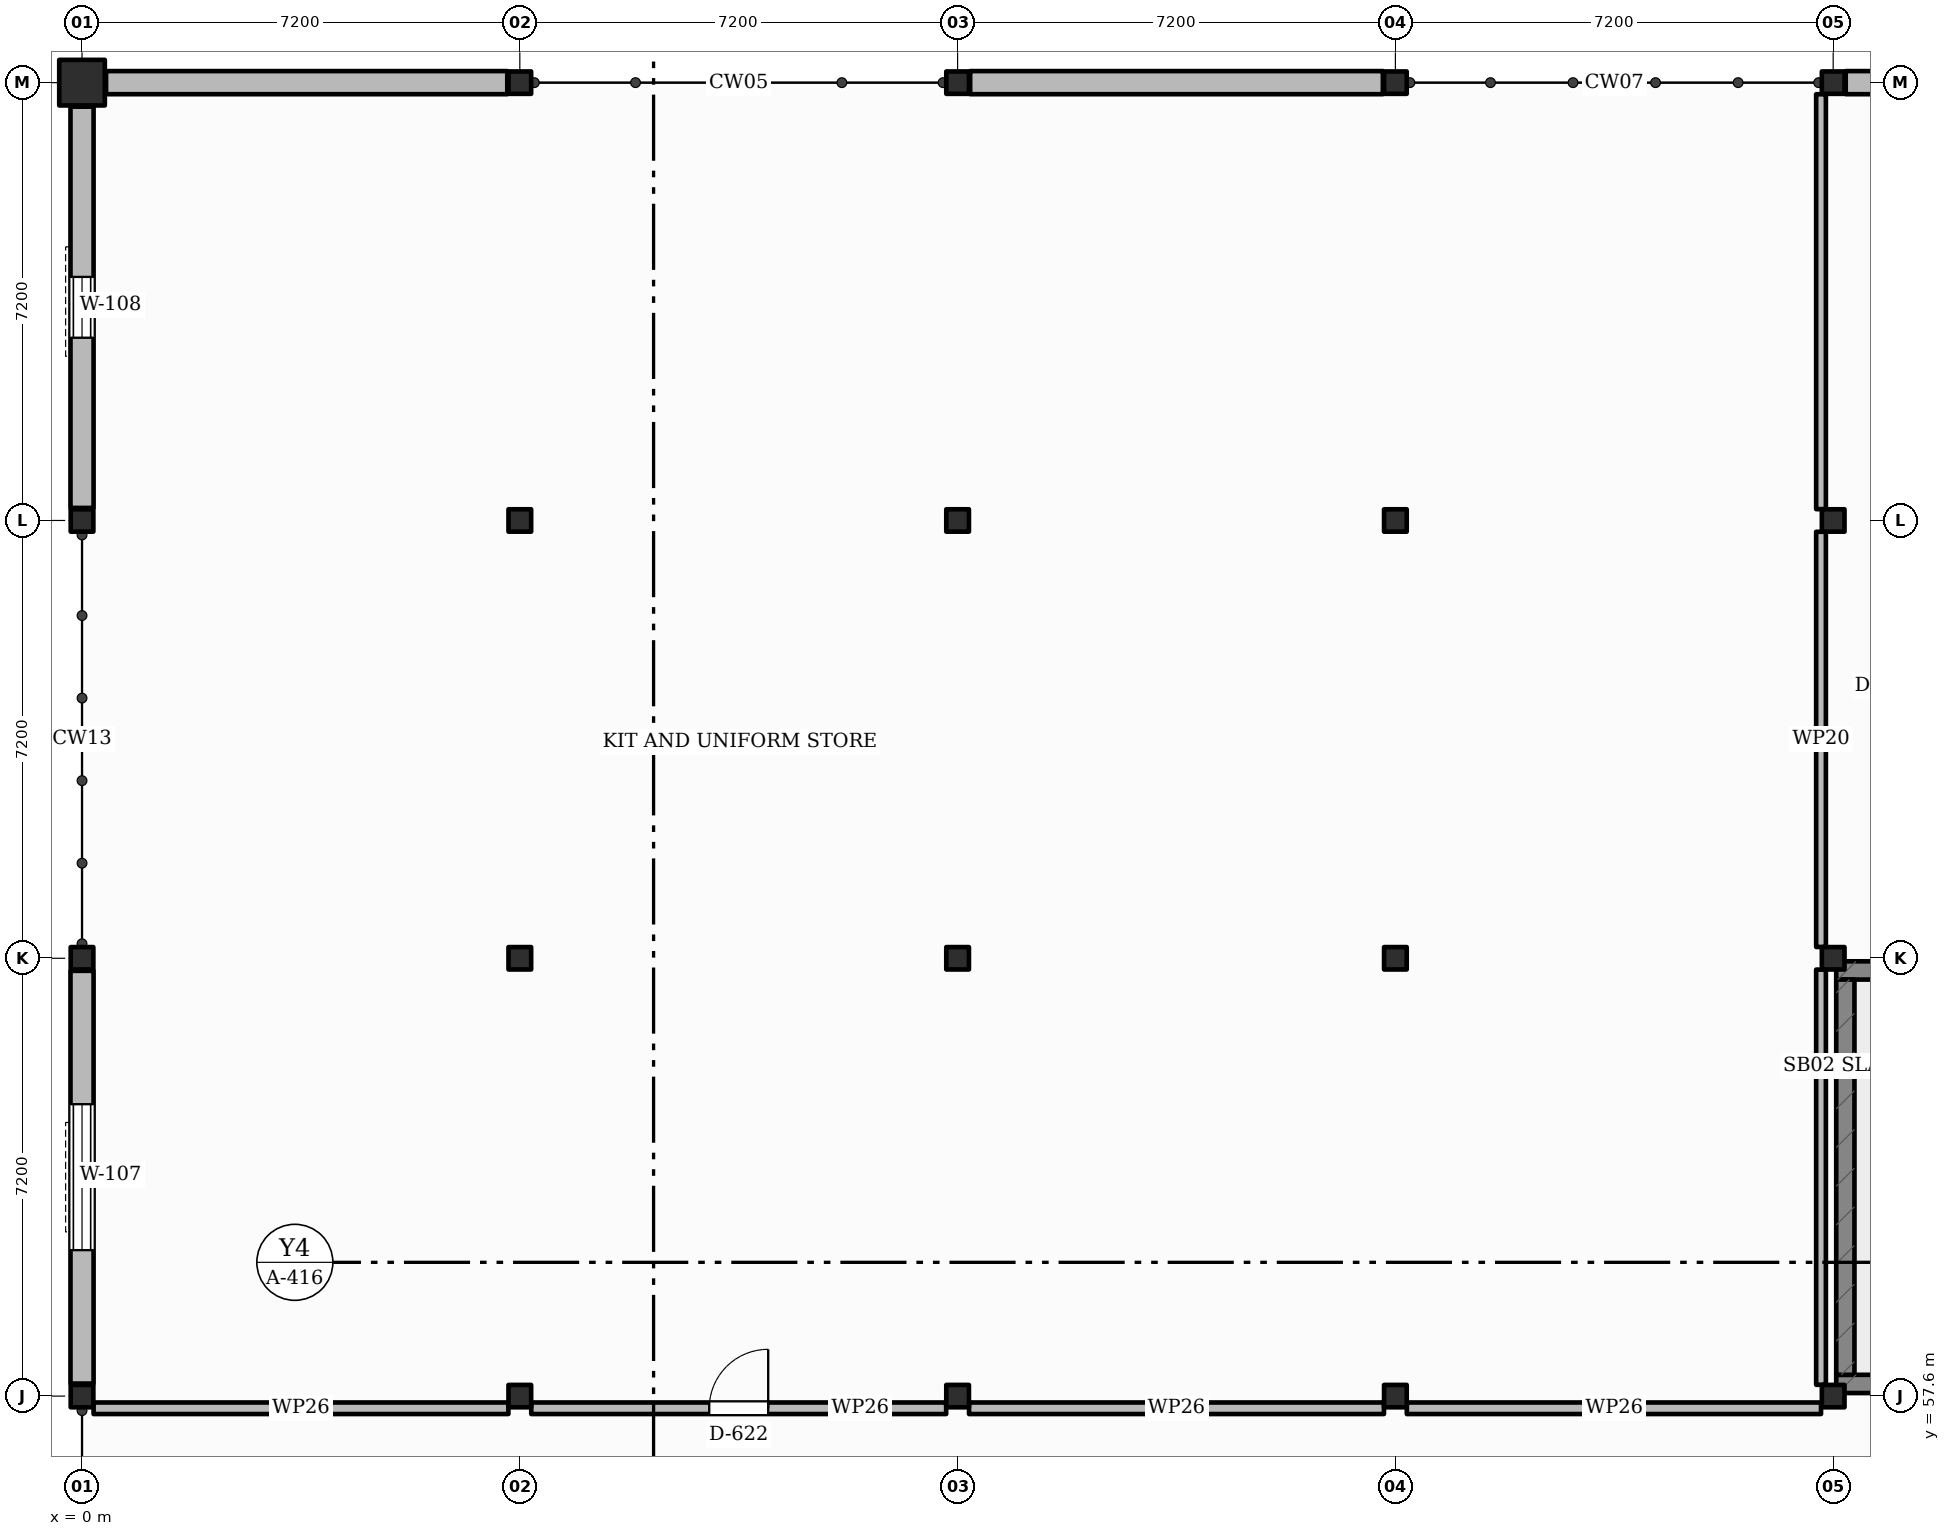
"""IFC4 building model, lengths in metres.
Left out: names, types, materials, properties, quantities, classifications, styles, units other than length and angle.
Written with IfcOpenShell. Run it as: python <this file> out.ifc"""

import sys

from ifc_helpers import new_model, si_unit, direction, frame, frame_2d, origin, origin_2d, place, context, subcontext, project, spatial, rectangle, i_section, extrude, element, fill, save


model = new_model("IFC4")
c1 = context("Model", 3, precision=1e-05, world=origin(), true_north=direction((0.0, 1.0)))
c2 = subcontext(c1, "Body", "Model", "MODEL_VIEW")
j1 = project(units=[si_unit("LENGTHUNIT", "METRE"), si_unit("PLANEANGLEUNIT", "RADIAN")], contexts=[c1])
p1 = place(None, origin())
s1 = spatial("IfcSite", under=j1, at=p1, CompositionType="ELEMENT")
p2 = place(p1, origin())
s2 = spatial("IfcBuilding", under=s1, at=p2, CompositionType="ELEMENT")
p3 = place(p2, origin())
s3 = spatial("IfcBuildingStorey", under=s2, at=p3, CompositionType="ELEMENT", Elevation=0.0)
for number, where, z_axis, x_axis in (
    (1, (0.0, 57.6, -0.3), (0.0, 0.0, 1.0), (1.0, 0.0, 0.0)),
    (2, (0.0, 64.8, -0.3), (0.0, 0.0, 1.0), (1.0, 0.0, 0.0)),
    (3, (0.0, 72.0, -0.3), (0.0, 0.0, 1.0), (1.0, 0.0, 0.0)),
):
    element("IfcColumn", number, at=place(p3, frame(where, z_axis=z_axis, x_axis=x_axis)), inside=s3, PredefinedType="COLUMN", context=c2, shape_type="SweptSolid", body=[
        extrude(i_section(OverallWidth=0.373, OverallDepth=0.368, WebThickness=0.014, FlangeThickness=0.024, FilletRadius=0.015, at=origin_2d()), origin(), (0.0, 0.0, 1.0), 5.7),
    ])
p4 = place(p3, frame((0.0, 79.2, -0.3), z_axis=(0.0, 0.0, 1.0), x_axis=(1.0, 0.0, 0.0)))
e4 = element("IfcColumn", 4, at=p4, inside=s3, PredefinedType="COLUMN", context=c2, shape_type="SweptSolid", body=[
    extrude(rectangle(XDim=0.75, YDim=0.75, at=origin_2d()), origin(), (0.0, 0.0, 1.0), 5.7),
])
for number, where, z_axis, x_axis in (
    (5, (7.2, 57.6, -0.3), (0.0, 0.0, 1.0), (1.0, 0.0, 0.0)),
    (6, (7.2, 64.8, -0.3), (0.0, 0.0, 1.0), (1.0, 0.0, 0.0)),
    (7, (7.2, 72.0, -0.3), (0.0, 0.0, 1.0), (1.0, 0.0, 0.0)),
    (8, (7.2, 79.2, -0.3), (0.0, 0.0, 1.0), (1.0, 0.0, 0.0)),
    (9, (14.4, 57.6, -0.3), (0.0, 0.0, 1.0), (1.0, 0.0, 0.0)),
    (10, (14.4, 64.8, -0.3), (0.0, 0.0, 1.0), (1.0, 0.0, 0.0)),
    (11, (14.4, 72.0, -0.3), (0.0, 0.0, 1.0), (1.0, 0.0, 0.0)),
    (12, (14.4, 79.2, -0.3), (0.0, 0.0, 1.0), (1.0, 0.0, 0.0)),
    (13, (21.6, 57.6, -0.3), (0.0, 0.0, 1.0), (1.0, 0.0, 0.0)),
    (14, (21.6, 64.8, -0.3), (0.0, 0.0, 1.0), (1.0, 0.0, 0.0)),
    (15, (21.6, 72.0, -0.3), (0.0, 0.0, 1.0), (1.0, 0.0, 0.0)),
    (16, (21.6, 79.2, -0.3), (0.0, 0.0, 1.0), (1.0, 0.0, 0.0)),
    (17, (28.8, 57.6, -0.3), (0.0, 0.0, 1.0), (1.0, 0.0, 0.0)),
    (18, (28.8, 64.8, -0.3), (0.0, 0.0, 1.0), (1.0, 0.0, 0.0)),
    (19, (28.8, 72.0, -0.3), (0.0, 0.0, 1.0), (1.0, 0.0, 0.0)),
    (20, (28.8, 79.2, -0.3), (0.0, 0.0, 1.0), (1.0, 0.0, 0.0)),
):
    element("IfcColumn", number, at=place(p3, frame(where, z_axis=z_axis, x_axis=x_axis)), inside=s3, PredefinedType="COLUMN", context=c2, shape_type="SweptSolid", body=[
        extrude(i_section(OverallWidth=0.373, OverallDepth=0.368, WebThickness=0.014, FlangeThickness=0.024, FilletRadius=0.015, at=origin_2d()), origin(), (0.0, 0.0, 1.0), 5.7),
    ])
p5 = place(p3, frame((0.0, 57.806, 0.0), z_axis=(0.0, 0.0, 1.0), x_axis=(0.0, 1.0, 0.0)))
e21 = element("IfcWall", 21, at=p5, inside=s3, PredefinedType="SOLIDWALL", context=c2, shape_type="SweptSolid", body=[
    extrude(rectangle(XDim=6.787, YDim=0.38, at=frame_2d((3.394, 0.0))), origin(), (0.0, 0.0, 1.0), 4.594),
])
p6 = place(p5, frame((2.194, 0.0, 1.05)))
e22 = element("IfcOpeningElement", 22, at=p6, cuts=e21, PredefinedType="OPENING", context=c2, shape_type="SweptSolid", body=[
    extrude(rectangle(XDim=2.4, YDim=1.8, at=frame_2d((1.2, 0.9))), frame((0.0, 0.2, 0.0), z_axis=(0.0, -1.0, 0.0), x_axis=(1.0, 0.0, 0.0)), (0.0, 0.0, 1.0), 0.4),
])
p7 = place(p3, frame((0.0, 72.206, 0.0), z_axis=(0.0, 0.0, 1.0), x_axis=(0.0, 1.0, 0.0)))
e23 = element("IfcWall", 23, at=p7, inside=s3, PredefinedType="SOLIDWALL", context=c2, shape_type="SweptSolid", body=[
    extrude(rectangle(XDim=6.599, YDim=0.38, at=frame_2d((3.299, 0.0))), origin(), (0.0, 0.0, 1.0), 4.594),
])
p8 = place(p7, frame((2.799, 0.0, 1.05)))
e24 = element("IfcOpeningElement", 24, at=p8, cuts=e23, PredefinedType="OPENING", context=c2, shape_type="SweptSolid", body=[
    extrude(rectangle(XDim=1.0, YDim=1.6, at=frame_2d((0.5, 0.8))), frame((0.0, 0.2, 0.0), z_axis=(0.0, -1.0, 0.0), x_axis=(1.0, 0.0, 0.0)), (0.0, 0.0, 1.0), 0.4),
])
p9 = place(p3, frame((0.395, 79.2, 0.0), z_axis=(0.0, 0.0, 1.0), x_axis=(1.0, 0.0, 0.0)))
e25 = element("IfcWall", 25, at=p9, inside=s3, PredefinedType="SOLIDWALL", context=c2, shape_type="SweptSolid", body=[
    extrude(rectangle(XDim=6.599, YDim=0.38, at=frame_2d((3.299, 0.0))), origin(), (0.0, 0.0, 1.0), 4.279),
])
p10 = place(p3, frame((14.606, 79.2, 0.0), z_axis=(0.0, 0.0, 1.0), x_axis=(1.0, 0.0, 0.0)))
e26 = element("IfcWall", 26, at=p10, inside=s3, PredefinedType="SOLIDWALL", context=c2, shape_type="SweptSolid", body=[
    extrude(rectangle(XDim=6.788, YDim=0.38, at=frame_2d((3.394, 0.0))), origin(), (0.0, 0.0, 1.0), 4.279),
])
p11 = place(p3, frame((29.006, 79.2, 0.0), z_axis=(0.0, 0.0, 1.0), x_axis=(1.0, 0.0, 0.0)))
e27 = element("IfcWall", 27, at=p11, inside=s3, PredefinedType="SOLIDWALL", context=c2, shape_type="SweptSolid", body=[
    extrude(rectangle(XDim=6.787, YDim=0.38, at=frame_2d((3.394, 0.0))), origin(), (0.0, 0.0, 1.0), 4.48),
])
p12 = place(p11, frame((2.719, 0.0, 0.0)))
e28 = element("IfcOpeningElement", 28, at=p12, cuts=e27, PredefinedType="OPENING", context=c2, shape_type="SweptSolid", body=[
    extrude(rectangle(XDim=1.35, YDim=2.15, at=frame_2d((0.675, 1.075))), frame((0.0, 0.2, 0.0), z_axis=(0.0, -1.0, 0.0), x_axis=(1.0, 0.0, 0.0)), (0.0, 0.0, 1.0), 0.4),
])
p13 = place(p3, frame((28.85, 57.8, 0.0), z_axis=(0.0, 0.0, 1.0), x_axis=(1.0, 0.0, 0.0)))
e29 = element("IfcWall", 29, at=p13, inside=s3, PredefinedType="SHEAR", context=c2, shape_type="SweptSolid", body=[
    extrude(rectangle(XDim=14.35, YDim=0.3, at=frame_2d((7.175, 0.0))), origin(), (0.0, 0.0, 1.0), 4.45),
])
p14 = place(p13, frame((11.5, 0.0, 0.0)))
e30 = element("IfcOpeningElement", 30, at=p14, cuts=e29, PredefinedType="OPENING", context=c2, shape_type="SweptSolid", body=[
    extrude(rectangle(XDim=1.5, YDim=2.15, at=frame_2d((0.75, 1.075))), frame((0.0, 0.16, 0.0), z_axis=(0.0, -1.0, 0.0), x_axis=(1.0, 0.0, 0.0)), (0.0, 0.0, 1.0), 0.32),
])
p15 = place(p3, frame((28.85, 64.6, 0.0), z_axis=(0.0, 0.0, 1.0), x_axis=(1.0, 0.0, 0.0)))
e31 = element("IfcWall", 31, at=p15, inside=s3, PredefinedType="SHEAR", context=c2, shape_type="SweptSolid", body=[
    extrude(rectangle(XDim=14.35, YDim=0.3, at=frame_2d((7.175, 0.0))), origin(), (0.0, 0.0, 1.0), 4.45),
])
p16 = place(p3, frame((29.0, 57.95, 0.0), z_axis=(0.0, 0.0, 1.0), x_axis=(0.0, 1.0, 0.0)))
e32 = element("IfcWall", 32, at=p16, inside=s3, PredefinedType="SHEAR", context=c2, shape_type="SweptSolid", body=[
    extrude(rectangle(XDim=6.5, YDim=0.3, at=frame_2d((3.25, 0.0))), origin(), (0.0, 0.0, 1.0), 4.45),
])
p17 = place(p3, frame((0.19, 57.4, 0.0), z_axis=(0.0, 0.0, 1.0), x_axis=(1.0, 0.0, 0.0)))
e33 = element("IfcWall", 33, at=p17, inside=s3, PredefinedType="PARTITIONING", context=c2, shape_type="SweptSolid", body=[
    extrude(rectangle(XDim=6.822, YDim=0.19, at=frame_2d((3.411, 0.0))), origin(), (0.0, 0.0, 1.0), 3.55),
])
p18 = place(p3, frame((7.388, 57.4, 0.0), z_axis=(0.0, 0.0, 1.0), x_axis=(1.0, 0.0, 0.0)))
e34 = element("IfcWall", 34, at=p18, inside=s3, PredefinedType="PARTITIONING", context=c2, shape_type="SweptSolid", body=[
    extrude(rectangle(XDim=6.824, YDim=0.19, at=frame_2d((3.412, 0.0))), origin(), (0.0, 0.0, 1.0), 3.55),
])
p19 = place(p18, frame((2.927, 0.0, 0.0)))
e35 = element("IfcOpeningElement", 35, at=p19, cuts=e34, PredefinedType="OPENING", context=c2, shape_type="SweptSolid", body=[
    extrude(rectangle(XDim=0.97, YDim=2.12, at=frame_2d((0.485, 1.06))), frame((0.0, 0.105, 0.0), z_axis=(0.0, -1.0, 0.0), x_axis=(1.0, 0.0, 0.0)), (0.0, 0.0, 1.0), 0.21),
])
p20 = place(p3, frame((14.588, 57.4, 0.0), z_axis=(0.0, 0.0, 1.0), x_axis=(1.0, 0.0, 0.0)))
e36 = element("IfcWall", 36, at=p20, inside=s3, PredefinedType="PARTITIONING", context=c2, shape_type="SweptSolid", body=[
    extrude(rectangle(XDim=6.824, YDim=0.19, at=frame_2d((3.412, 0.0))), origin(), (0.0, 0.0, 1.0), 3.55),
])
p21 = place(p3, frame((21.788, 57.4, 0.0), z_axis=(0.0, 0.0, 1.0), x_axis=(1.0, 0.0, 0.0)))
e37 = element("IfcWall", 37, at=p21, inside=s3, PredefinedType="PARTITIONING", context=c2, shape_type="SweptSolid", body=[
    extrude(rectangle(XDim=6.812, YDim=0.19, at=frame_2d((3.406, 0.0))), origin(), (0.0, 0.0, 1.0), 3.55),
])
p22 = place(p3, frame((28.6, 57.786, 0.0), z_axis=(0.0, 0.0, 1.0), x_axis=(0.0, 1.0, 0.0)))
e38 = element("IfcWall", 38, at=p22, inside=s3, PredefinedType="PARTITIONING", context=c2, shape_type="SweptSolid", body=[
    extrude(rectangle(XDim=6.828, YDim=0.16, at=frame_2d((3.414, 0.0))), origin(), (0.0, 0.0, 1.0), 3.55),
])
p23 = place(p3, frame((28.6, 64.986, 0.0), z_axis=(0.0, 0.0, 1.0), x_axis=(0.0, 1.0, 0.0)))
e39 = element("IfcWall", 39, at=p23, inside=s3, PredefinedType="PARTITIONING", context=c2, shape_type="SweptSolid", body=[
    extrude(rectangle(XDim=6.828, YDim=0.16, at=frame_2d((3.414, 0.0))), origin(), (0.0, 0.0, 1.0), 3.55),
])
p24 = place(p3, frame((28.6, 72.186, 0.0), z_axis=(0.0, 0.0, 1.0), x_axis=(0.0, 1.0, 0.0)))
e40 = element("IfcWall", 40, at=p24, inside=s3, PredefinedType="PARTITIONING", context=c2, shape_type="SweptSolid", body=[
    extrude(rectangle(XDim=6.824, YDim=0.16, at=frame_2d((3.412, 0.0))), origin(), (0.0, 0.0, 1.0), 3.55),
])
p25 = place(p6, origin())
e41 = element("IfcWindow", 41, at=p25, inside=s3, PartitioningType="SINGLE_PANEL", PredefinedType="WINDOW", context=c2, shape_type="SweptSolid", body=[
    extrude(rectangle(XDim=2.4, YDim=1.8, at=frame_2d((1.2, 0.9))), frame((0.0, 0.03, 0.0), z_axis=(0.0, -1.0, 0.0), x_axis=(1.0, 0.0, 0.0)), (0.0, 0.0, 1.0), 0.06),
])
fill(e22, e41)
p26 = place(p8, origin())
e42 = element("IfcWindow", 42, at=p26, inside=s3, PartitioningType="SINGLE_PANEL", PredefinedType="WINDOW", context=c2, shape_type="SweptSolid", body=[
    extrude(rectangle(XDim=1.0, YDim=1.6, at=frame_2d((0.5, 0.8))), frame((0.0, 0.03, 0.0), z_axis=(0.0, -1.0, 0.0), x_axis=(1.0, 0.0, 0.0)), (0.0, 0.0, 1.0), 0.06),
])
fill(e24, e42)
p27 = place(p19, origin())
e43 = element("IfcDoor", 43, at=p27, inside=s3, OperationType="SINGLE_SWING_RIGHT", PredefinedType="DOOR", context=c2, shape_type="SweptSolid", body=[
    extrude(rectangle(XDim=0.97, YDim=2.12, at=frame_2d((0.485, 1.06))), frame((0.0, 0.025, 0.0), z_axis=(0.0, -1.0, 0.0), x_axis=(1.0, 0.0, 0.0)), (0.0, 0.0, 1.0), 0.05),
])
fill(e35, e43)
save(model, sys.argv[1])
